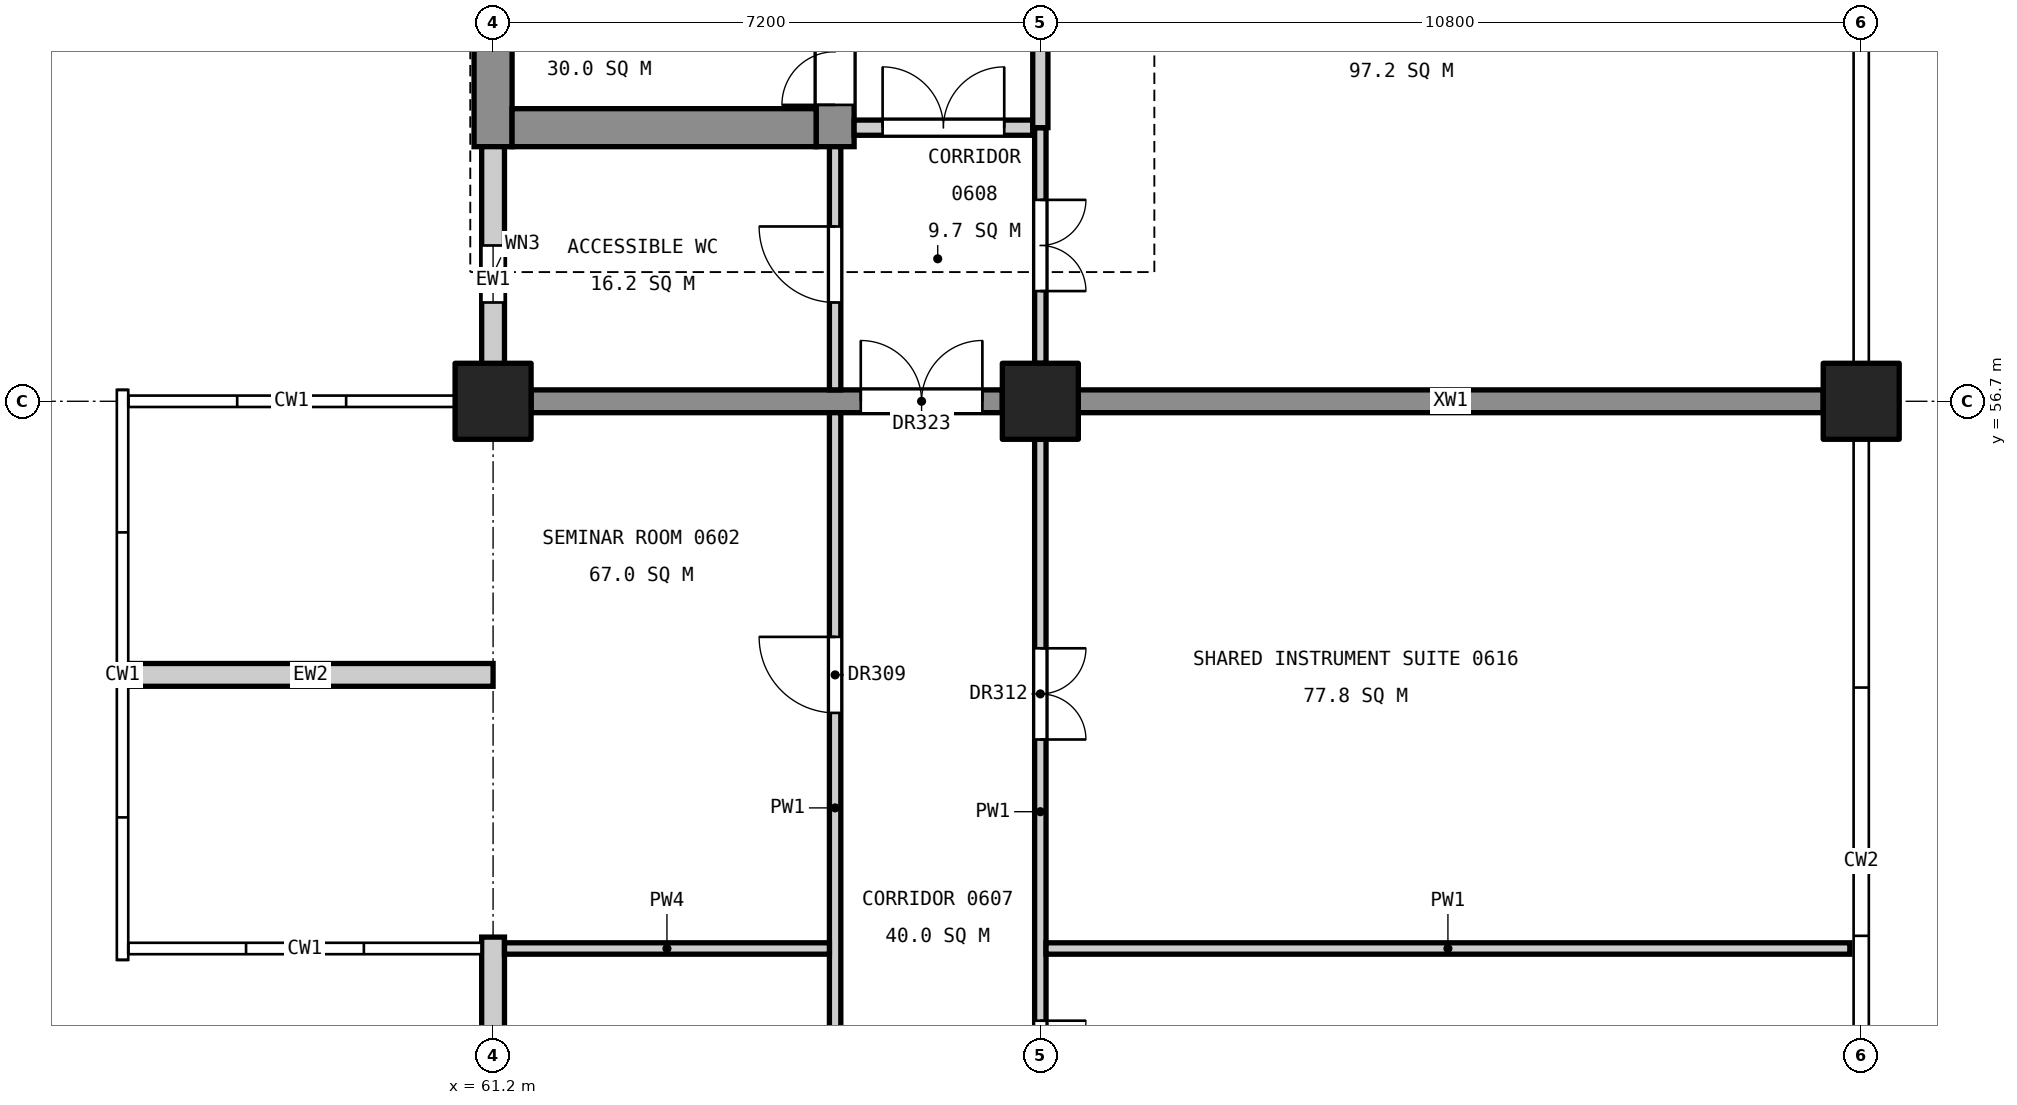
"""IFC4 building model, lengths in metres.
Left out: names, types, materials, properties, quantities, classifications, styles, units other than length and angle.
Written with IfcOpenShell. Run it as: python <this file> out.ifc"""

import sys

from ifc_helpers import new_model, si_unit, direction, frame, frame_2d, origin, origin_2d, place, context, subcontext, project, spatial, rectangle, extrude, element, fill, save


model = new_model("IFC4")
c1 = context("Model", 3, precision=1e-05, world=origin(), true_north=direction((0.0, 1.0)))
c2 = subcontext(c1, "Body", "Model", "MODEL_VIEW")
j1 = project(units=[si_unit("LENGTHUNIT", "METRE"), si_unit("PLANEANGLEUNIT", "RADIAN")], contexts=[c1])
p1 = place(None, origin())
s1 = spatial("IfcSite", under=j1, at=p1, CompositionType="ELEMENT")
p2 = place(p1, origin())
s2 = spatial("IfcBuilding", under=s1, at=p2, CompositionType="ELEMENT")
p3 = place(p2, frame((0.0, 0.0, 31.8)))
s3 = spatial("IfcBuildingStorey", under=s2, at=p3, CompositionType="ELEMENT", Elevation=31.8)
for number, where, z_axis, x_axis in (
    (1, (61.2, 56.7, 0.0), (0.0, 0.0, 1.0), (1.0, 0.0, 0.0)),
    (2, (68.4, 56.7, 0.0), (0.0, 0.0, 1.0), (1.0, 0.0, 0.0)),
    (3, (79.2, 56.7, 0.0), (0.0, 0.0, 1.0), (1.0, 0.0, 0.0)),
):
    element("IfcColumn", number, at=place(p3, frame(where, z_axis=z_axis, x_axis=x_axis)), inside=s3, PredefinedType="COLUMN", context=c2, shape_type="SweptSolid", body=[
        extrude(rectangle(XDim=1.0, YDim=1.0, at=origin_2d()), origin(), (0.0, 0.0, 1.0), 4.8),
    ])
p4 = place(p3, frame((61.2, 60.05, 0.0), z_axis=(0.0, 0.0, 1.0), x_axis=(0.0, 1.0, 0.0)))
e4 = element("IfcWall", 4, at=p4, inside=s3, PredefinedType="SHEAR", context=c2, shape_type="SweptSolid", body=[
    extrude(rectangle(XDim=14.9, YDim=0.5, at=frame_2d((7.45, 0.0))), origin(), (0.0, 0.0, 1.0), 4.55),
])
p5 = place(p4, frame((6.16, 0.0, 3.4)))
e5 = element("IfcOpeningElement", 5, at=p5, cuts=e4, PredefinedType="OPENING", context=c2, shape_type="SweptSolid", body=[
    extrude(rectangle(XDim=1.2, YDim=0.9, at=frame_2d((0.6, 0.45))), frame((0.0, 0.26, 0.0), z_axis=(0.0, -1.0, 0.0), x_axis=(1.0, 0.0, 0.0)), (0.0, 0.0, 1.0), 0.52),
])
p6 = place(p3, frame((65.7, 60.05, 0.0), z_axis=(0.0, 0.0, 1.0), x_axis=(0.0, 1.0, 0.0)))
e6 = element("IfcWall", 6, at=p6, inside=s3, PredefinedType="SHEAR", context=c2, shape_type="SweptSolid", body=[
    extrude(rectangle(XDim=14.9, YDim=0.5, at=frame_2d((7.45, 0.0))), origin(), (0.0, 0.0, 1.0), 4.55),
])
p7 = place(p6, frame((0.55, 0.0, 0.0)))
e7 = element("IfcOpeningElement", 7, at=p7, cuts=e6, PredefinedType="OPENING", context=c2, shape_type="SweptSolid", body=[
    extrude(rectangle(XDim=1.4, YDim=2.1, at=frame_2d((0.7, 1.05))), frame((0.0, 0.26, 0.0), z_axis=(0.0, -1.0, 0.0), x_axis=(1.0, 0.0, 0.0)), (0.0, 0.0, 1.0), 0.52),
])
p8 = place(p6, frame((8.85, 0.0, 0.0)))
e8 = element("IfcOpeningElement", 8, at=p8, cuts=e6, PredefinedType="OPENING", context=c2, shape_type="SweptSolid", body=[
    extrude(rectangle(XDim=1.1, YDim=2.1, at=frame_2d((0.55, 1.05))), frame((0.0, 0.26, 0.0), z_axis=(0.0, -1.0, 0.0), x_axis=(1.0, 0.0, 0.0)), (0.0, 0.0, 1.0), 0.52),
])
p9 = place(p6, frame((11.4, 0.0, 0.0)))
e9 = element("IfcOpeningElement", 9, at=p9, cuts=e6, PredefinedType="OPENING", context=c2, shape_type="SweptSolid", body=[
    extrude(rectangle(XDim=1.1, YDim=2.1, at=frame_2d((0.55, 1.05))), frame((0.0, 0.26, 0.0), z_axis=(0.0, -1.0, 0.0), x_axis=(1.0, 0.0, 0.0)), (0.0, 0.0, 1.0), 0.52),
])
p10 = place(p3, frame((61.45, 60.3, 0.0), z_axis=(0.0, 0.0, 1.0), x_axis=(1.0, 0.0, 0.0)))
e10 = element("IfcWall", 10, at=p10, inside=s3, PredefinedType="SHEAR", context=c2, shape_type="SweptSolid", body=[
    extrude(rectangle(XDim=4.0, YDim=0.5, at=frame_2d((2.0, 0.0))), origin(), (0.0, 0.0, 1.0), 4.55),
])
p11 = place(p3, frame((61.7, 56.7, 0.0), z_axis=(0.0, 0.0, 1.0), x_axis=(1.0, 0.0, 0.0)))
e11 = element("IfcWall", 11, at=p11, inside=s3, PredefinedType="SHEAR", context=c2, shape_type="SweptSolid", body=[
    extrude(rectangle(XDim=6.2, YDim=0.3, at=frame_2d((3.1, 0.0))), origin(), (0.0, 0.0, 1.0), 4.55),
])
p12 = place(p11, frame((4.337, 0.0, 0.0)))
e12 = element("IfcOpeningElement", 12, at=p12, cuts=e11, PredefinedType="OPENING", context=c2, shape_type="SweptSolid", body=[
    extrude(rectangle(XDim=1.6, YDim=2.1, at=frame_2d((0.8, 1.05))), frame((0.0, 0.16, 0.0), z_axis=(0.0, -1.0, 0.0), x_axis=(1.0, 0.0, 0.0)), (0.0, 0.0, 1.0), 0.32),
])
p13 = place(p3, frame((68.9, 56.7, 0.0), z_axis=(0.0, 0.0, 1.0), x_axis=(1.0, 0.0, 0.0)))
e13 = element("IfcWall", 13, at=p13, inside=s3, PredefinedType="SHEAR", context=c2, shape_type="SweptSolid", body=[
    extrude(rectangle(XDim=9.8, YDim=0.3, at=frame_2d((4.9, 0.0))), origin(), (0.0, 0.0, 1.0), 4.55),
])
p14 = place(p3, frame((61.2, 46.15, 0.0), z_axis=(0.0, 0.0, 1.0), x_axis=(0.0, 1.0, 0.0)))
e14 = element("IfcWall", 14, at=p14, inside=s3, PredefinedType="STANDARD", context=c2, shape_type="SweptSolid", body=[
    extrude(rectangle(XDim=3.5, YDim=0.3, at=frame_2d((1.75, 0.0))), origin(), (0.0, 0.0, 1.0), 3.65),
])
p15 = place(p14, frame((1.3, 0.0, 0.8)))
e15 = element("IfcOpeningElement", 15, at=p15, cuts=e14, PredefinedType="OPENING", context=c2, shape_type="SweptSolid", body=[
    extrude(rectangle(XDim=0.75, YDim=1.2, at=frame_2d((0.375, 0.6))), frame((0.0, 0.16, 0.0), z_axis=(0.0, -1.0, 0.0), x_axis=(1.0, 0.0, 0.0)), (0.0, 0.0, 1.0), 0.32),
])
p16 = place(p3, frame((61.2, 56.55, 0.0), z_axis=(0.0, 0.0, 1.0), x_axis=(0.0, 1.0, 0.0)))
e16 = element("IfcWall", 16, at=p16, inside=s3, PredefinedType="STANDARD", context=c2, shape_type="SweptSolid", body=[
    extrude(rectangle(XDim=3.5, YDim=0.3, at=frame_2d((1.75, 0.0))), origin(), (0.0, 0.0, 1.0), 3.65),
])
p17 = place(p16, frame((1.45, 0.0, 0.8)))
e17 = element("IfcOpeningElement", 17, at=p17, cuts=e16, PredefinedType="OPENING", context=c2, shape_type="SweptSolid", body=[
    extrude(rectangle(XDim=0.75, YDim=1.2, at=frame_2d((0.375, 0.6))), frame((0.0, 0.16, 0.0), z_axis=(0.0, -1.0, 0.0), x_axis=(1.0, 0.0, 0.0)), (0.0, 0.0, 1.0), 0.32),
])
p18 = place(p3, frame((56.4, 53.1, 0.0), z_axis=(0.0, 0.0, 1.0), x_axis=(1.0, 0.0, 0.0)))
e18 = element("IfcWall", 18, at=p18, inside=s3, PredefinedType="STANDARD", context=c2, shape_type="SweptSolid", body=[
    extrude(rectangle(XDim=4.8, YDim=0.3, at=frame_2d((2.4, 0.0))), origin(), (0.0, 0.0, 1.0), 3.65),
])
p19 = place(p3, frame((65.7, 46.15, 0.0), z_axis=(0.0, 0.0, 1.0), x_axis=(0.0, 1.0, 0.0)))
e19 = element("IfcWall", 19, at=p19, inside=s3, PredefinedType="PARTITIONING", context=c2, shape_type="SweptSolid", body=[
    extrude(rectangle(XDim=10.4, YDim=0.15, at=frame_2d((5.2, 0.0))), origin(), (0.0, 0.0, 1.0), 3.55),
])
p20 = place(p19, frame((1.05, 0.0, 0.0)))
e20 = element("IfcOpeningElement", 20, at=p20, cuts=e19, PredefinedType="OPENING", context=c2, shape_type="SweptSolid", body=[
    extrude(rectangle(XDim=1.0, YDim=2.1, at=frame_2d((0.5, 1.05))), frame((0.0, 0.085, 0.0), z_axis=(0.0, -1.0, 0.0), x_axis=(1.0, 0.0, 0.0)), (0.0, 0.0, 1.0), 0.17),
])
p21 = place(p19, frame((6.45, 0.0, 0.0)))
e21 = element("IfcOpeningElement", 21, at=p21, cuts=e19, PredefinedType="OPENING", context=c2, shape_type="SweptSolid", body=[
    extrude(rectangle(XDim=1.0, YDim=2.1, at=frame_2d((0.5, 1.05))), frame((0.0, 0.085, 0.0), z_axis=(0.0, -1.0, 0.0), x_axis=(1.0, 0.0, 0.0)), (0.0, 0.0, 1.0), 0.17),
])
p22 = place(p3, frame((65.7, 56.85, 0.0), z_axis=(0.0, 0.0, 1.0), x_axis=(0.0, 1.0, 0.0)))
e22 = element("IfcWall", 22, at=p22, inside=s3, PredefinedType="PARTITIONING", context=c2, shape_type="SweptSolid", body=[
    extrude(rectangle(XDim=3.2, YDim=0.15, at=frame_2d((1.6, 0.0))), origin(), (0.0, 0.0, 1.0), 3.55),
])
p23 = place(p22, frame((1.15, 0.0, 0.0)))
e23 = element("IfcOpeningElement", 23, at=p23, cuts=e22, PredefinedType="OPENING", context=c2, shape_type="SweptSolid", body=[
    extrude(rectangle(XDim=1.0, YDim=2.1, at=frame_2d((0.5, 1.05))), frame((0.0, 0.085, 0.0), z_axis=(0.0, -1.0, 0.0), x_axis=(1.0, 0.0, 0.0)), (0.0, 0.0, 1.0), 0.17),
])
p24 = place(p3, frame((61.35, 49.5, 0.0), z_axis=(0.0, 0.0, 1.0), x_axis=(1.0, 0.0, 0.0)))
e24 = element("IfcWall", 24, at=p24, inside=s3, PredefinedType="PARTITIONING", context=c2, shape_type="SweptSolid", body=[
    extrude(rectangle(XDim=4.275, YDim=0.15, at=frame_2d((2.137, 0.0))), origin(), (0.0, 0.0, 1.0), 3.85),
])
p25 = place(p3, frame((65.95, 60.3, 0.0), z_axis=(0.0, 0.0, 1.0), x_axis=(1.0, 0.0, 0.0)))
e25 = element("IfcWall", 25, at=p25, inside=s3, PredefinedType="PARTITIONING", context=c2, shape_type="SweptSolid", body=[
    extrude(rectangle(XDim=2.35, YDim=0.2, at=frame_2d((1.175, 0.0))), origin(), (0.0, 0.0, 1.0), 3.85),
])
p26 = place(p25, frame((0.375, 0.0, 0.0)))
e26 = element("IfcOpeningElement", 26, at=p26, cuts=e25, PredefinedType="OPENING", context=c2, shape_type="SweptSolid", body=[
    extrude(rectangle(XDim=1.6, YDim=2.1, at=frame_2d((0.8, 1.05))), frame((0.0, 0.11, 0.0), z_axis=(0.0, -1.0, 0.0), x_axis=(1.0, 0.0, 0.0)), (0.0, 0.0, 1.0), 0.22),
])
p27 = place(p3, frame((68.4, 46.4, 0.0), z_axis=(0.0, 0.0, 1.0), x_axis=(0.0, 1.0, 0.0)))
e27 = element("IfcWall", 27, at=p27, inside=s3, PredefinedType="PARTITIONING", context=c2, shape_type="SweptSolid", body=[
    extrude(rectangle(XDim=9.8, YDim=0.15, at=frame_2d((4.9, 0.0))), origin(), (0.0, 0.0, 1.0), 3.55),
])
p28 = place(p27, frame((0.95, 0.0, 0.0)))
e28 = element("IfcOpeningElement", 28, at=p28, cuts=e27, PredefinedType="OPENING", context=c2, shape_type="SweptSolid", body=[
    extrude(rectangle(XDim=1.2, YDim=2.1, at=frame_2d((0.6, 1.05))), frame((0.0, 0.085, 0.0), z_axis=(0.0, -1.0, 0.0), x_axis=(1.0, 0.0, 0.0)), (0.0, 0.0, 1.0), 0.17),
])
p29 = place(p27, frame((5.85, 0.0, 0.0)))
e29 = element("IfcOpeningElement", 29, at=p29, cuts=e27, PredefinedType="OPENING", context=c2, shape_type="SweptSolid", body=[
    extrude(rectangle(XDim=1.2, YDim=2.1, at=frame_2d((0.6, 1.05))), frame((0.0, 0.085, 0.0), z_axis=(0.0, -1.0, 0.0), x_axis=(1.0, 0.0, 0.0)), (0.0, 0.0, 1.0), 0.17),
])
p30 = place(p3, frame((68.4, 57.2, 0.0), z_axis=(0.0, 0.0, 1.0), x_axis=(0.0, 1.0, 0.0)))
e30 = element("IfcWall", 30, at=p30, inside=s3, PredefinedType="PARTITIONING", context=c2, shape_type="SweptSolid", body=[
    extrude(rectangle(XDim=3.1, YDim=0.15, at=frame_2d((1.55, 0.0))), origin(), (0.0, 0.0, 1.0), 3.55),
])
p31 = place(p30, frame((0.95, 0.0, 0.0)))
e31 = element("IfcOpeningElement", 31, at=p31, cuts=e30, PredefinedType="OPENING", context=c2, shape_type="SweptSolid", body=[
    extrude(rectangle(XDim=1.2, YDim=2.1, at=frame_2d((0.6, 1.05))), frame((0.0, 0.085, 0.0), z_axis=(0.0, -1.0, 0.0), x_axis=(1.0, 0.0, 0.0)), (0.0, 0.0, 1.0), 0.17),
])
p32 = place(p3, frame((68.4, 60.3, 0.0), z_axis=(0.0, 0.0, 1.0), x_axis=(0.0, 1.0, 0.0)))
e32 = element("IfcWall", 32, at=p32, inside=s3, PredefinedType="PARTITIONING", context=c2, shape_type="SweptSolid", body=[
    extrude(rectangle(XDim=4.2, YDim=0.2, at=frame_2d((2.1, 0.0))), origin(), (0.0, 0.0, 1.0), 3.55),
])
p33 = place(p3, frame((68.475, 49.5, 0.0), z_axis=(0.0, 0.0, 1.0), x_axis=(1.0, 0.0, 0.0)))
e33 = element("IfcWall", 33, at=p33, inside=s3, PredefinedType="PARTITIONING", context=c2, shape_type="SweptSolid", body=[
    extrude(rectangle(XDim=10.575, YDim=0.15, at=frame_2d((5.288, 0.0))), origin(), (0.0, 0.0, 1.0), 3.85),
])
p34 = place(p7, origin())
e34 = element("IfcDoor", 34, at=p34, inside=s3, OperationType="DOUBLE_DOOR_SINGLE_SWING", PredefinedType="DOOR", context=c2, shape_type="SweptSolid", body=[
    extrude(rectangle(XDim=1.4, YDim=2.1, at=frame_2d((0.7, 1.05))), frame((0.0, 0.025, 0.0), z_axis=(0.0, -1.0, 0.0), x_axis=(1.0, 0.0, 0.0)), (0.0, 0.0, 1.0), 0.05),
])
fill(e7, e34)
p35 = place(p17, origin())
e35 = element("IfcWindow", 35, at=p35, inside=s3, PartitioningType="SINGLE_PANEL", PredefinedType="WINDOW", context=c2, shape_type="SweptSolid", body=[
    extrude(rectangle(XDim=0.75, YDim=1.2, at=frame_2d((0.375, 0.6))), frame((0.0, 0.03, 0.0), z_axis=(0.0, -1.0, 0.0), x_axis=(1.0, 0.0, 0.0)), (0.0, 0.0, 1.0), 0.06),
])
fill(e17, e35)
p36 = place(p23, origin())
e36 = element("IfcDoor", 36, at=p36, inside=s3, OperationType="SINGLE_SWING_RIGHT", PredefinedType="DOOR", context=c2, shape_type="SweptSolid", body=[
    extrude(rectangle(XDim=1.0, YDim=2.1, at=frame_2d((0.5, 1.05))), frame((0.0, 0.025, 0.0), z_axis=(0.0, -1.0, 0.0), x_axis=(1.0, 0.0, 0.0)), (0.0, 0.0, 1.0), 0.05),
])
fill(e23, e36)
p37 = place(p28, frame((1.2, 0.0, 0.0), z_axis=(0.0, 0.0, 1.0), x_axis=(-1.0, 0.0, 0.0)))
e37 = element("IfcDoor", 37, at=p37, inside=s3, OperationType="DOUBLE_DOOR_SINGLE_SWING", PredefinedType="DOOR", context=c2, shape_type="SweptSolid", body=[
    extrude(rectangle(XDim=1.2, YDim=2.1, at=frame_2d((0.6, 1.05))), frame((0.0, 0.025, 0.0), z_axis=(0.0, -1.0, 0.0), x_axis=(1.0, 0.0, 0.0)), (0.0, 0.0, 1.0), 0.05),
])
fill(e28, e37)
p38 = place(p21, origin())
e38 = element("IfcDoor", 38, at=p38, inside=s3, OperationType="SINGLE_SWING_RIGHT", PredefinedType="DOOR", context=c2, shape_type="SweptSolid", body=[
    extrude(rectangle(XDim=1.0, YDim=2.1, at=frame_2d((0.5, 1.05))), frame((0.0, 0.025, 0.0), z_axis=(0.0, -1.0, 0.0), x_axis=(1.0, 0.0, 0.0)), (0.0, 0.0, 1.0), 0.05),
])
fill(e21, e38)
p39 = place(p29, frame((1.2, 0.0, 0.0), z_axis=(0.0, 0.0, 1.0), x_axis=(-1.0, 0.0, 0.0)))
e39 = element("IfcDoor", 39, at=p39, inside=s3, OperationType="DOUBLE_DOOR_SINGLE_SWING", PredefinedType="DOOR", context=c2, shape_type="SweptSolid", body=[
    extrude(rectangle(XDim=1.2, YDim=2.1, at=frame_2d((0.6, 1.05))), frame((0.0, 0.025, 0.0), z_axis=(0.0, -1.0, 0.0), x_axis=(1.0, 0.0, 0.0)), (0.0, 0.0, 1.0), 0.05),
])
fill(e29, e39)
p40 = place(p31, frame((1.2, 0.0, 0.0), z_axis=(0.0, 0.0, 1.0), x_axis=(-1.0, 0.0, 0.0)))
e40 = element("IfcDoor", 40, at=p40, inside=s3, OperationType="DOUBLE_DOOR_SINGLE_SWING", PredefinedType="DOOR", context=c2, shape_type="SweptSolid", body=[
    extrude(rectangle(XDim=1.2, YDim=2.1, at=frame_2d((0.6, 1.05))), frame((0.0, 0.025, 0.0), z_axis=(0.0, -1.0, 0.0), x_axis=(1.0, 0.0, 0.0)), (0.0, 0.0, 1.0), 0.05),
])
fill(e31, e40)
p41 = place(p26, origin())
e41 = element("IfcDoor", 41, at=p41, inside=s3, OperationType="DOUBLE_DOOR_SINGLE_SWING", PredefinedType="DOOR", context=c2, shape_type="SweptSolid", body=[
    extrude(rectangle(XDim=1.6, YDim=2.1, at=frame_2d((0.8, 1.05))), frame((0.0, 0.025, 0.0), z_axis=(0.0, -1.0, 0.0), x_axis=(1.0, 0.0, 0.0)), (0.0, 0.0, 1.0), 0.05),
])
fill(e26, e41)
p42 = place(p12, origin())
e42 = element("IfcDoor", 42, at=p42, inside=s3, OperationType="DOUBLE_DOOR_SINGLE_SWING", PredefinedType="DOOR", context=c2, shape_type="SweptSolid", body=[
    extrude(rectangle(XDim=1.6, YDim=2.1, at=frame_2d((0.8, 1.05))), frame((0.0, 0.025, 0.0), z_axis=(0.0, -1.0, 0.0), x_axis=(1.0, 0.0, 0.0)), (0.0, 0.0, 1.0), 0.05),
])
fill(e12, e42)
save(model, sys.argv[1])
